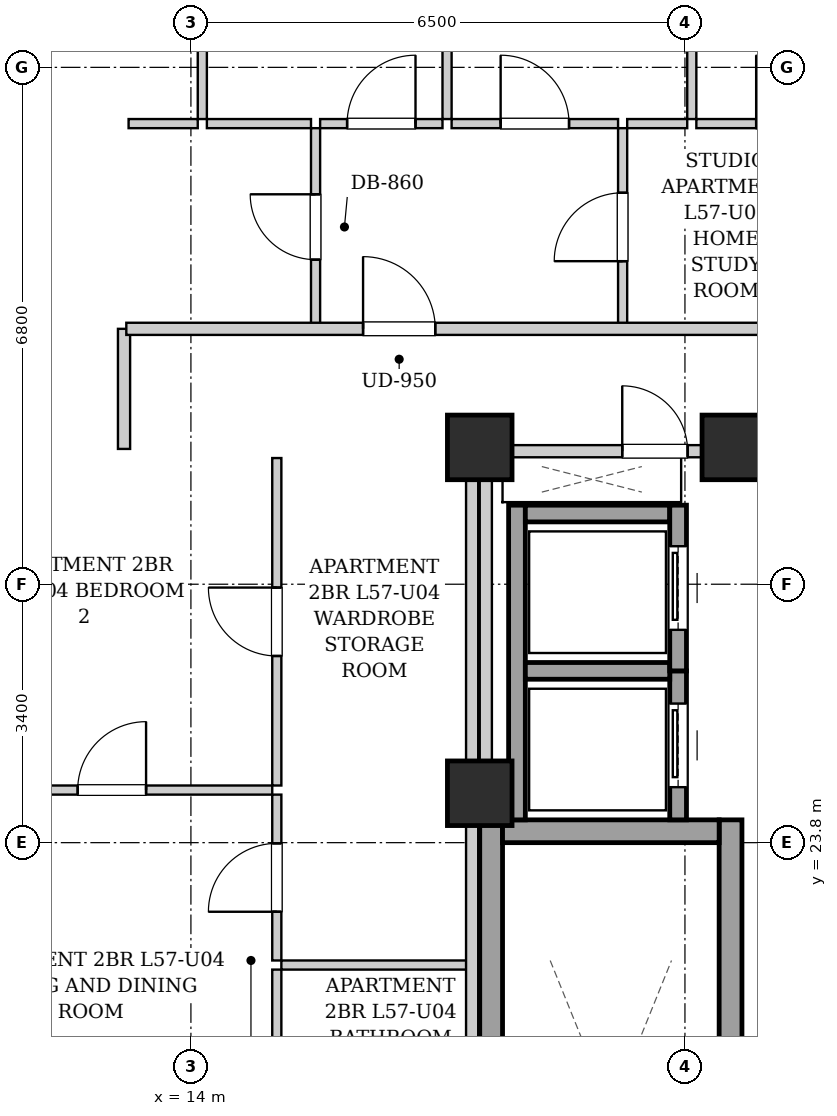
"""IFC4 building model, lengths in metres.
Left out: names, types, materials, properties, quantities, classifications, styles, units other than length and angle.
Written with IfcOpenShell. Run it as: python <this file> out.ifc"""

import sys

from ifc_helpers import new_model, si_unit, direction, frame, frame_2d, origin, origin_2d, place, context, subcontext, project, spatial, rectangle, extrude, element, fill, save


model = new_model("IFC4")
c1 = context("Model", 3, precision=1e-05, world=origin(), true_north=direction((0.0, 1.0)))
c2 = subcontext(c1, "Body", "Model", "MODEL_VIEW")
j1 = project(units=[si_unit("LENGTHUNIT", "METRE"), si_unit("PLANEANGLEUNIT", "RADIAN")], contexts=[c1])
p1 = place(None, origin())
s1 = spatial("IfcSite", under=j1, at=p1, CompositionType="ELEMENT")
p2 = place(p1, origin())
s2 = spatial("IfcBuilding", under=s1, at=p2, CompositionType="ELEMENT")
p3 = place(p2, frame((0.0, 0.0, 197.5)))
s3 = spatial("IfcBuildingStorey", under=s2, at=p3, CompositionType="ELEMENT", Elevation=197.5)
for number, where, z_axis, x_axis in (
    (1, (17.8, 29.0, 0.0), (0.0, 0.0, 1.0), (1.0, 0.0, 0.0)),
    (2, (21.15, 29.0, 0.0), (0.0, 0.0, 1.0), (1.0, 0.0, 0.0)),
    (3, (17.8, 24.45, 0.0), (0.0, 0.0, 1.0), (1.0, 0.0, 0.0)),
):
    element("IfcColumn", number, at=place(p3, frame(where, z_axis=z_axis, x_axis=x_axis)), inside=s3, PredefinedType="COLUMN", context=c2, shape_type="SweptSolid", body=[
        extrude(rectangle(XDim=0.85, YDim=0.85, at=origin_2d()), origin(), (0.0, 0.0, 1.0), 3.3),
    ])
for number, where, z_axis, x_axis in (
    (4, (17.95, 15.1, 0.0), (0.0, 0.0, 1.0), (0.0, 1.0, 0.0)),
    (5, (21.1, 15.1, 0.0), (0.0, 0.0, 1.0), (0.0, 1.0, 0.0)),
):
    element("IfcWall", number, at=place(p3, frame(where, z_axis=z_axis, x_axis=x_axis)), inside=s3, PredefinedType="SHEAR", context=c2, shape_type="SweptSolid", body=[
        extrude(rectangle(XDim=9.0, YDim=0.3, at=frame_2d((4.5, 0.0))), origin(), (0.0, 0.0, 1.0), 3.04),
    ])
p4 = place(p3, frame((18.1, 23.95, 0.0), z_axis=(0.0, 0.0, 1.0), x_axis=(1.0, 0.0, 0.0)))
e6 = element("IfcWall", 6, at=p4, inside=s3, PredefinedType="SHEAR", context=c2, shape_type="SweptSolid", body=[
    extrude(rectangle(XDim=2.85, YDim=0.3, at=frame_2d((1.425, 0.0))), origin(), (0.0, 0.0, 1.0), 3.04),
])
p5 = place(p3, frame((18.29, 24.1, 0.0), z_axis=(0.0, 0.0, 1.0), x_axis=(0.0, 1.0, 0.0)))
e7 = element("IfcWall", 7, at=p5, inside=s3, PredefinedType="SHEAR", context=c2, shape_type="SweptSolid", body=[
    extrude(rectangle(XDim=4.14, YDim=0.22, at=frame_2d((2.07, 0.0))), origin(), (0.0, 0.0, 1.0), 3.04),
])
p6 = place(p3, frame((20.41, 24.1, 0.0), z_axis=(0.0, 0.0, 1.0), x_axis=(0.0, 1.0, 0.0)))
e8 = element("IfcWall", 8, at=p6, inside=s3, PredefinedType="SHEAR", context=c2, shape_type="SweptSolid", body=[
    extrude(rectangle(XDim=1.96, YDim=0.22, at=frame_2d((0.98, 0.0))), origin(), (0.0, 0.0, 1.0), 3.04),
])
p7 = place(p6, frame((0.43, 0.0, 0.0)))
e9 = element("IfcOpeningElement", 9, at=p7, cuts=e8, PredefinedType="OPENING", context=c2, shape_type="SweptSolid", body=[
    extrude(rectangle(XDim=1.1, YDim=2.15, at=frame_2d((0.55, 1.075))), frame((0.0, 0.12, 0.0), z_axis=(0.0, -1.0, 0.0), x_axis=(1.0, 0.0, 0.0)), (0.0, 0.0, 1.0), 0.24),
])
for number, where, z_axis, x_axis in (
    (10, (18.4, 26.06, 0.0), (0.0, 0.0, 1.0), (1.0, 0.0, 0.0)),
    (11, (18.4, 28.13, 0.0), (0.0, 0.0, 1.0), (1.0, 0.0, 0.0)),
):
    element("IfcWall", number, at=place(p3, frame(where, z_axis=z_axis, x_axis=x_axis)), inside=s3, PredefinedType="SHEAR", context=c2, shape_type="SweptSolid", body=[
        extrude(rectangle(XDim=1.9, YDim=0.22, at=frame_2d((0.95, 0.0))), origin(), (0.0, 0.0, 1.0), 3.04),
    ])
p8 = place(p3, frame((20.41, 26.06, 0.0), z_axis=(0.0, 0.0, 1.0), x_axis=(0.0, 1.0, 0.0)))
e12 = element("IfcWall", 12, at=p8, inside=s3, PredefinedType="SHEAR", context=c2, shape_type="SweptSolid", body=[
    extrude(rectangle(XDim=2.18, YDim=0.22, at=frame_2d((1.09, 0.0))), origin(), (0.0, 0.0, 1.0), 3.04),
])
p9 = place(p8, frame((0.54, 0.0, 0.0)))
e13 = element("IfcOpeningElement", 13, at=p9, cuts=e12, PredefinedType="OPENING", context=c2, shape_type="SweptSolid", body=[
    extrude(rectangle(XDim=1.1, YDim=2.15, at=frame_2d((0.55, 1.075))), frame((0.0, 0.12, 0.0), z_axis=(0.0, -1.0, 0.0), x_axis=(1.0, 0.0, 0.0)), (0.0, 0.0, 1.0), 0.24),
])
p10 = place(p3, frame((17.88, 24.12, 0.0), z_axis=(0.0, 0.0, 1.0), x_axis=(0.0, 1.0, 0.0)))
e14 = element("IfcWall", 14, at=p10, inside=s3, PredefinedType="PARTITIONING", context=c2, shape_type="SweptSolid", body=[
    extrude(rectangle(XDim=4.76, YDim=0.16, at=frame_2d((2.38, 0.0))), origin(), (0.0, 0.0, 1.0), 2.375),
])
p11 = place(p3, frame((17.96, 28.95, 0.0), z_axis=(0.0, 0.0, 1.0), x_axis=(1.0, 0.0, 0.0)))
e15 = element("IfcWall", 15, at=p11, inside=s3, PredefinedType="PARTITIONING", context=c2, shape_type="SweptSolid", body=[
    extrude(rectangle(XDim=4.29, YDim=0.16, at=frame_2d((2.145, 0.0))), origin(), (0.0, 0.0, 1.0), 2.556),
])
p12 = place(p11, frame((1.715, 0.0, 0.0)))
e16 = element("IfcOpeningElement", 16, at=p12, cuts=e15, PredefinedType="OPENING", context=c2, shape_type="SweptSolid", body=[
    extrude(rectangle(XDim=0.86, YDim=2.05, at=frame_2d((0.43, 1.025))), frame((0.0, 0.09, 0.0), z_axis=(0.0, -1.0, 0.0), x_axis=(1.0, 0.0, 0.0)), (0.0, 0.0, 1.0), 0.18),
])
p13 = place(p3, frame((13.12, 28.98, 0.0), z_axis=(0.0, 0.0, 1.0), x_axis=(0.0, 1.0, 0.0)))
e17 = element("IfcWall", 17, at=p13, inside=s3, PredefinedType="PARTITIONING", context=c2, shape_type="SweptSolid", body=[
    extrude(rectangle(XDim=1.58, YDim=0.16, at=frame_2d((0.79, 0.0))), origin(), (0.0, 0.0, 1.0), 3.04),
])
p14 = place(p3, frame((15.64, 30.6, 0.0), z_axis=(0.0, 0.0, 1.0), x_axis=(0.0, 1.0, 0.0)))
e18 = element("IfcWall", 18, at=p14, inside=s3, PredefinedType="PARTITIONING", context=c2, shape_type="SweptSolid", body=[
    extrude(rectangle(XDim=2.6, YDim=0.12, at=frame_2d((1.3, 0.0))), origin(), (0.0, 0.0, 1.0), 3.04),
])
p15 = place(p14, frame((0.87, 0.0, 0.0)))
e19 = element("IfcOpeningElement", 19, at=p15, cuts=e18, PredefinedType="OPENING", context=c2, shape_type="SweptSolid", body=[
    extrude(rectangle(XDim=0.86, YDim=2.05, at=frame_2d((0.43, 1.025))), frame((0.0, 0.07, 0.0), z_axis=(0.0, -1.0, 0.0), x_axis=(1.0, 0.0, 0.0)), (0.0, 0.0, 1.0), 0.14),
])
p16 = place(p3, frame((13.18, 33.26, 0.0), z_axis=(0.0, 0.0, 1.0), x_axis=(1.0, 0.0, 0.0)))
e20 = element("IfcWall", 20, at=p16, inside=s3, PredefinedType="PARTITIONING", context=c2, shape_type="SweptSolid", body=[
    extrude(rectangle(XDim=0.91, YDim=0.12, at=frame_2d((0.455, 0.0))), origin(), (0.0, 0.0, 1.0), 3.04),
])
p17 = place(p3, frame((14.21, 33.26, 0.0), z_axis=(0.0, 0.0, 1.0), x_axis=(1.0, 0.0, 0.0)))
e21 = element("IfcWall", 21, at=p17, inside=s3, PredefinedType="PARTITIONING", context=c2, shape_type="SweptSolid", body=[
    extrude(rectangle(XDim=1.37, YDim=0.12, at=frame_2d((0.685, 0.0))), origin(), (0.0, 0.0, 1.0), 3.04),
])
p18 = place(p3, frame((19.68, 30.6, 0.0), z_axis=(0.0, 0.0, 1.0), x_axis=(0.0, 1.0, 0.0)))
e22 = element("IfcWall", 22, at=p18, inside=s3, PredefinedType="PARTITIONING", context=c2, shape_type="SweptSolid", body=[
    extrude(rectangle(XDim=2.6, YDim=0.12, at=frame_2d((1.3, 0.0))), origin(), (0.0, 0.0, 1.0), 3.04),
])
p19 = place(p18, frame((0.85, 0.0, 0.0)))
e23 = element("IfcOpeningElement", 23, at=p19, cuts=e22, PredefinedType="OPENING", context=c2, shape_type="SweptSolid", body=[
    extrude(rectangle(XDim=0.9, YDim=2.05, at=frame_2d((0.45, 1.025))), frame((0.0, 0.07, 0.0), z_axis=(0.0, -1.0, 0.0), x_axis=(1.0, 0.0, 0.0)), (0.0, 0.0, 1.0), 0.14),
])
p20 = place(p3, frame((15.7, 33.26, 0.0), z_axis=(0.0, 0.0, 1.0), x_axis=(1.0, 0.0, 0.0)))
e24 = element("IfcWall", 24, at=p20, inside=s3, PredefinedType="PARTITIONING", context=c2, shape_type="SweptSolid", body=[
    extrude(rectangle(XDim=1.61, YDim=0.12, at=frame_2d((0.805, 0.0))), origin(), (0.0, 0.0, 1.0), 3.04),
])
p21 = place(p20, frame((0.355, 0.0, 0.0)))
e25 = element("IfcOpeningElement", 25, at=p21, cuts=e24, PredefinedType="OPENING", context=c2, shape_type="SweptSolid", body=[
    extrude(rectangle(XDim=0.9, YDim=2.05, at=frame_2d((0.45, 1.025))), frame((0.0, 0.07, 0.0), z_axis=(0.0, -1.0, 0.0), x_axis=(1.0, 0.0, 0.0)), (0.0, 0.0, 1.0), 0.14),
])
p22 = place(p3, frame((17.43, 33.26, 0.0), z_axis=(0.0, 0.0, 1.0), x_axis=(1.0, 0.0, 0.0)))
e26 = element("IfcWall", 26, at=p22, inside=s3, PredefinedType="PARTITIONING", context=c2, shape_type="SweptSolid", body=[
    extrude(rectangle(XDim=2.19, YDim=0.12, at=frame_2d((1.095, 0.0))), origin(), (0.0, 0.0, 1.0), 3.04),
])
p23 = place(p22, frame((0.645, 0.0, 0.0)))
e27 = element("IfcOpeningElement", 27, at=p23, cuts=e26, PredefinedType="OPENING", context=c2, shape_type="SweptSolid", body=[
    extrude(rectangle(XDim=0.9, YDim=2.05, at=frame_2d((0.45, 1.025))), frame((0.0, 0.07, 0.0), z_axis=(0.0, -1.0, 0.0), x_axis=(1.0, 0.0, 0.0)), (0.0, 0.0, 1.0), 0.14),
])
p24 = place(p3, frame((19.74, 33.26, 0.0), z_axis=(0.0, 0.0, 1.0), x_axis=(1.0, 0.0, 0.0)))
e28 = element("IfcWall", 28, at=p24, inside=s3, PredefinedType="PARTITIONING", context=c2, shape_type="SweptSolid", body=[
    extrude(rectangle(XDim=0.79, YDim=0.12, at=frame_2d((0.395, 0.0))), origin(), (0.0, 0.0, 1.0), 3.04),
])
p25 = place(p3, frame((20.65, 33.26, 0.0), z_axis=(0.0, 0.0, 1.0), x_axis=(1.0, 0.0, 0.0)))
e29 = element("IfcWall", 29, at=p25, inside=s3, PredefinedType="PARTITIONING", context=c2, shape_type="SweptSolid", body=[
    extrude(rectangle(XDim=2.475, YDim=0.12, at=frame_2d((1.238, 0.0))), origin(), (0.0, 0.0, 1.0), 3.04),
])
p26 = place(p25, frame((0.787, 0.0, 0.0)))
e30 = element("IfcOpeningElement", 30, at=p26, cuts=e29, PredefinedType="OPENING", context=c2, shape_type="SweptSolid", body=[
    extrude(rectangle(XDim=0.9, YDim=2.05, at=frame_2d((0.45, 1.025))), frame((0.0, 0.07, 0.0), z_axis=(0.0, -1.0, 0.0), x_axis=(1.0, 0.0, 0.0)), (0.0, 0.0, 1.0), 0.14),
])
p27 = place(p3, frame((14.15, 33.32, 0.0), z_axis=(0.0, 0.0, 1.0), x_axis=(0.0, 1.0, 0.0)))
e31 = element("IfcWall", 31, at=p27, inside=s3, PredefinedType="PARTITIONING", context=c2, shape_type="SweptSolid", body=[
    extrude(rectangle(XDim=6.6, YDim=0.12, at=frame_2d((3.3, 0.0))), origin(), (0.0, 0.0, 1.0), 3.04),
])
p28 = place(p27, frame((2.835, 0.0, 0.0)))
e32 = element("IfcOpeningElement", 32, at=p28, cuts=e31, PredefinedType="OPENING", context=c2, shape_type="SweptSolid", body=[
    extrude(rectangle(XDim=0.9, YDim=2.05, at=frame_2d((0.45, 1.025))), frame((0.0, 0.07, 0.0), z_axis=(0.0, -1.0, 0.0), x_axis=(1.0, 0.0, 0.0)), (0.0, 0.0, 1.0), 0.14),
])
p29 = place(p3, frame((17.37, 33.32, 0.0), z_axis=(0.0, 0.0, 1.0), x_axis=(0.0, 1.0, 0.0)))
e33 = element("IfcWall", 33, at=p29, inside=s3, PredefinedType="PARTITIONING", context=c2, shape_type="SweptSolid", body=[
    extrude(rectangle(XDim=6.6, YDim=0.12, at=frame_2d((3.3, 0.0))), origin(), (0.0, 0.0, 1.0), 3.04),
])
p30 = place(p29, frame((2.835, 0.0, 0.0)))
e34 = element("IfcOpeningElement", 34, at=p30, cuts=e33, PredefinedType="OPENING", context=c2, shape_type="SweptSolid", body=[
    extrude(rectangle(XDim=0.9, YDim=2.05, at=frame_2d((0.45, 1.025))), frame((0.0, 0.07, 0.0), z_axis=(0.0, -1.0, 0.0), x_axis=(1.0, 0.0, 0.0)), (0.0, 0.0, 1.0), 0.14),
])
p31 = place(p3, frame((20.59, 33.32, 0.0), z_axis=(0.0, 0.0, 1.0), x_axis=(0.0, 1.0, 0.0)))
e35 = element("IfcWall", 35, at=p31, inside=s3, PredefinedType="PARTITIONING", context=c2, shape_type="SweptSolid", body=[
    extrude(rectangle(XDim=6.6, YDim=0.12, at=frame_2d((3.3, 0.0))), origin(), (0.0, 0.0, 1.0), 3.04),
])
p32 = place(p31, frame((2.835, 0.0, 0.0)))
e36 = element("IfcOpeningElement", 36, at=p32, cuts=e35, PredefinedType="OPENING", context=c2, shape_type="SweptSolid", body=[
    extrude(rectangle(XDim=0.9, YDim=2.05, at=frame_2d((0.45, 1.025))), frame((0.0, 0.07, 0.0), z_axis=(0.0, -1.0, 0.0), x_axis=(1.0, 0.0, 0.0)), (0.0, 0.0, 1.0), 0.14),
])
p33 = place(p3, frame((15.19, 22.19, 0.0), z_axis=(0.0, 0.0, 1.0), x_axis=(1.0, 0.0, 0.0)))
e37 = element("IfcWall", 37, at=p33, inside=s3, PredefinedType="PARTITIONING", context=c2, shape_type="SweptSolid", body=[
    extrude(rectangle(XDim=2.45, YDim=0.12, at=frame_2d((1.225, 0.0))), origin(), (0.0, 0.0, 1.0), 3.04),
])
p34 = place(p3, frame((15.13, 22.25, 0.0), z_axis=(0.0, 0.0, 1.0), x_axis=(0.0, 1.0, 0.0)))
e38 = element("IfcWall", 38, at=p34, inside=s3, PredefinedType="PARTITIONING", context=c2, shape_type="SweptSolid", body=[
    extrude(rectangle(XDim=2.182, YDim=0.12, at=frame_2d((1.091, 0.0))), origin(), (0.0, 0.0, 1.0), 3.04),
])
p35 = place(p34, frame((0.641, 0.0, 0.0)))
e39 = element("IfcOpeningElement", 39, at=p35, cuts=e38, PredefinedType="OPENING", context=c2, shape_type="SweptSolid", body=[
    extrude(rectangle(XDim=0.9, YDim=2.05, at=frame_2d((0.45, 1.025))), frame((0.0, 0.07, 0.0), z_axis=(0.0, -1.0, 0.0), x_axis=(1.0, 0.0, 0.0)), (0.0, 0.0, 1.0), 0.14),
])
p36 = place(p3, frame((15.13, 24.552, 0.0), z_axis=(0.0, 0.0, 1.0), x_axis=(0.0, 1.0, 0.0)))
e40 = element("IfcWall", 40, at=p36, inside=s3, PredefinedType="PARTITIONING", context=c2, shape_type="SweptSolid", body=[
    extrude(rectangle(XDim=4.308, YDim=0.12, at=frame_2d((2.154, 0.0))), origin(), (0.0, 0.0, 1.0), 3.04),
])
p37 = place(p36, frame((1.704, 0.0, 0.0)))
e41 = element("IfcOpeningElement", 41, at=p37, cuts=e40, PredefinedType="OPENING", context=c2, shape_type="SweptSolid", body=[
    extrude(rectangle(XDim=0.9, YDim=2.05, at=frame_2d((0.45, 1.025))), frame((0.0, 0.07, 0.0), z_axis=(0.0, -1.0, 0.0), x_axis=(1.0, 0.0, 0.0)), (0.0, 0.0, 1.0), 0.14),
])
p38 = place(p3, frame((15.13, 19.83, 0.0), z_axis=(0.0, 0.0, 1.0), x_axis=(0.0, 1.0, 0.0)))
e42 = element("IfcWall", 42, at=p38, inside=s3, PredefinedType="PARTITIONING", context=c2, shape_type="SweptSolid", body=[
    extrude(rectangle(XDim=2.3, YDim=0.12, at=frame_2d((1.15, 0.0))), origin(), (0.0, 0.0, 1.0), 3.04),
])
p39 = place(p3, frame((10.88, 24.492, 0.0), z_axis=(0.0, 0.0, 1.0), x_axis=(1.0, 0.0, 0.0)))
e43 = element("IfcWall", 43, at=p39, inside=s3, PredefinedType="PARTITIONING", context=c2, shape_type="SweptSolid", body=[
    extrude(rectangle(XDim=4.19, YDim=0.12, at=frame_2d((2.095, 0.0))), origin(), (0.0, 0.0, 1.0), 2.722),
])
p40 = place(p39, frame((1.63, 0.0, 0.0)))
e44 = element("IfcOpeningElement", 44, at=p40, cuts=e43, PredefinedType="OPENING", context=c2, shape_type="SweptSolid", body=[
    extrude(rectangle(XDim=0.9, YDim=2.05, at=frame_2d((0.45, 1.025))), frame((0.0, 0.07, 0.0), z_axis=(0.0, -1.0, 0.0), x_axis=(1.0, 0.0, 0.0)), (0.0, 0.0, 1.0), 0.14),
])
p41 = place(p3, frame((13.15, 30.56, 0.0), z_axis=(0.0, 0.0, 1.0), x_axis=(1.0, 0.0, 0.0)))
e45 = element("IfcWall", 45, at=p41, inside=s3, PredefinedType="PARTITIONING", context=c2, shape_type="SweptSolid", body=[
    extrude(rectangle(XDim=24.6, YDim=0.16, at=frame_2d((12.3, 0.0))), origin(), (0.0, 0.0, 1.0), 3.04),
])
p42 = place(p41, frame((3.115, 0.0, 0.0)))
e46 = element("IfcOpeningElement", 46, at=p42, cuts=e45, PredefinedType="OPENING", context=c2, shape_type="SweptSolid", body=[
    extrude(rectangle(XDim=0.95, YDim=2.1, at=frame_2d((0.475, 1.05))), frame((0.0, 0.09, 0.0), z_axis=(0.0, -1.0, 0.0), x_axis=(1.0, 0.0, 0.0)), (0.0, 0.0, 1.0), 0.18),
])
p43 = place(p3, frame((17.7, 15.02, 0.0), z_axis=(0.0, 0.0, 1.0), x_axis=(0.0, 1.0, 0.0)))
e47 = element("IfcWall", 47, at=p43, inside=s3, PredefinedType="PARTITIONING", context=c2, shape_type="SweptSolid", body=[
    extrude(rectangle(XDim=13.98, YDim=0.16, at=frame_2d((6.99, 0.0))), origin(), (0.0, 0.0, 1.0), 2.375),
])
p44 = place(p7, origin())
e48 = element("IfcDoor", 48, at=p44, inside=s3, OperationType="SLIDING_TO_LEFT", PredefinedType="DOOR", context=c2, shape_type="SweptSolid", body=[
    extrude(rectangle(XDim=1.1, YDim=2.15, at=frame_2d((0.55, 1.075))), frame((0.0, 0.025, 0.0), z_axis=(0.0, -1.0, 0.0), x_axis=(1.0, 0.0, 0.0)), (0.0, 0.0, 1.0), 0.05),
])
fill(e9, e48)
p45 = place(p9, origin())
e49 = element("IfcDoor", 49, at=p45, inside=s3, OperationType="SLIDING_TO_LEFT", PredefinedType="DOOR", context=c2, shape_type="SweptSolid", body=[
    extrude(rectangle(XDim=1.1, YDim=2.15, at=frame_2d((0.55, 1.075))), frame((0.0, 0.025, 0.0), z_axis=(0.0, -1.0, 0.0), x_axis=(1.0, 0.0, 0.0)), (0.0, 0.0, 1.0), 0.05),
])
fill(e13, e49)
p46 = place(p12, origin())
e50 = element("IfcDoor", 50, at=p46, inside=s3, OperationType="SINGLE_SWING_LEFT", PredefinedType="DOOR", context=c2, shape_type="SweptSolid", body=[
    extrude(rectangle(XDim=0.86, YDim=2.05, at=frame_2d((0.43, 1.025))), frame((0.0, 0.025, 0.0), z_axis=(0.0, -1.0, 0.0), x_axis=(1.0, 0.0, 0.0)), (0.0, 0.0, 1.0), 0.05),
])
fill(e16, e50)
p47 = place(p15, origin())
e51 = element("IfcDoor", 51, at=p47, inside=s3, OperationType="SINGLE_SWING_RIGHT", PredefinedType="DOOR", context=c2, shape_type="SweptSolid", body=[
    extrude(rectangle(XDim=0.86, YDim=2.05, at=frame_2d((0.43, 1.025))), frame((0.0, 0.025, 0.0), z_axis=(0.0, -1.0, 0.0), x_axis=(1.0, 0.0, 0.0)), (0.0, 0.0, 1.0), 0.05),
])
fill(e19, e51)
p48 = place(p19, origin())
e52 = element("IfcDoor", 52, at=p48, inside=s3, OperationType="SINGLE_SWING_LEFT", PredefinedType="DOOR", context=c2, shape_type="SweptSolid", body=[
    extrude(rectangle(XDim=0.9, YDim=2.05, at=frame_2d((0.45, 1.025))), frame((0.0, 0.025, 0.0), z_axis=(0.0, -1.0, 0.0), x_axis=(1.0, 0.0, 0.0)), (0.0, 0.0, 1.0), 0.05),
])
fill(e23, e52)
p49 = place(p21, origin())
e53 = element("IfcDoor", 53, at=p49, inside=s3, OperationType="SINGLE_SWING_RIGHT", PredefinedType="DOOR", context=c2, shape_type="SweptSolid", body=[
    extrude(rectangle(XDim=0.9, YDim=2.05, at=frame_2d((0.45, 1.025))), frame((0.0, 0.025, 0.0), z_axis=(0.0, -1.0, 0.0), x_axis=(1.0, 0.0, 0.0)), (0.0, 0.0, 1.0), 0.05),
])
fill(e25, e53)
p50 = place(p23, origin())
e54 = element("IfcDoor", 54, at=p50, inside=s3, OperationType="SINGLE_SWING_LEFT", PredefinedType="DOOR", context=c2, shape_type="SweptSolid", body=[
    extrude(rectangle(XDim=0.9, YDim=2.05, at=frame_2d((0.45, 1.025))), frame((0.0, 0.025, 0.0), z_axis=(0.0, -1.0, 0.0), x_axis=(1.0, 0.0, 0.0)), (0.0, 0.0, 1.0), 0.05),
])
fill(e27, e54)
p51 = place(p26, origin())
e55 = element("IfcDoor", 55, at=p51, inside=s3, OperationType="SINGLE_SWING_LEFT", PredefinedType="DOOR", context=c2, shape_type="SweptSolid", body=[
    extrude(rectangle(XDim=0.9, YDim=2.05, at=frame_2d((0.45, 1.025))), frame((0.0, 0.025, 0.0), z_axis=(0.0, -1.0, 0.0), x_axis=(1.0, 0.0, 0.0)), (0.0, 0.0, 1.0), 0.05),
])
fill(e30, e55)
p52 = place(p35, origin())
e56 = element("IfcDoor", 56, at=p52, inside=s3, OperationType="SINGLE_SWING_LEFT", PredefinedType="DOOR", context=c2, shape_type="SweptSolid", body=[
    extrude(rectangle(XDim=0.9, YDim=2.05, at=frame_2d((0.45, 1.025))), frame((0.0, 0.025, 0.0), z_axis=(0.0, -1.0, 0.0), x_axis=(1.0, 0.0, 0.0)), (0.0, 0.0, 1.0), 0.05),
])
fill(e39, e56)
p53 = place(p37, origin())
e57 = element("IfcDoor", 57, at=p53, inside=s3, OperationType="SINGLE_SWING_RIGHT", PredefinedType="DOOR", context=c2, shape_type="SweptSolid", body=[
    extrude(rectangle(XDim=0.9, YDim=2.05, at=frame_2d((0.45, 1.025))), frame((0.0, 0.025, 0.0), z_axis=(0.0, -1.0, 0.0), x_axis=(1.0, 0.0, 0.0)), (0.0, 0.0, 1.0), 0.05),
])
fill(e41, e57)
p54 = place(p40, origin())
e58 = element("IfcDoor", 58, at=p54, inside=s3, OperationType="SINGLE_SWING_RIGHT", PredefinedType="DOOR", context=c2, shape_type="SweptSolid", body=[
    extrude(rectangle(XDim=0.9, YDim=2.05, at=frame_2d((0.45, 1.025))), frame((0.0, 0.025, 0.0), z_axis=(0.0, -1.0, 0.0), x_axis=(1.0, 0.0, 0.0)), (0.0, 0.0, 1.0), 0.05),
])
fill(e44, e58)
p55 = place(p42, origin())
e59 = element("IfcDoor", 59, at=p55, inside=s3, OperationType="SINGLE_SWING_LEFT", PredefinedType="DOOR", context=c2, shape_type="SweptSolid", body=[
    extrude(rectangle(XDim=0.95, YDim=2.1, at=frame_2d((0.475, 1.05))), frame((0.0, 0.025, 0.0), z_axis=(0.0, -1.0, 0.0), x_axis=(1.0, 0.0, 0.0)), (0.0, 0.0, 1.0), 0.05),
])
fill(e46, e59)
save(model, sys.argv[1])
